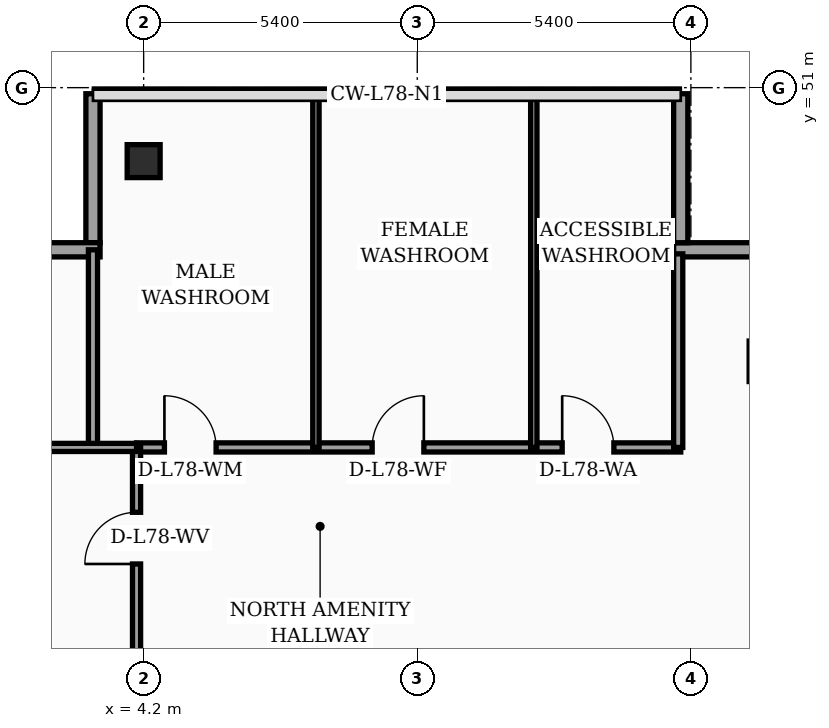
"""IFC4 building model, lengths in metres.
Left out: names, types, materials, properties, quantities, classifications, styles, units other than length and angle.
Written with IfcOpenShell. Run it as: python <this file> out.ifc"""

import sys

from ifc_helpers import new_model, si_unit, direction, frame, frame_2d, origin, origin_2d, place, context, subcontext, project, spatial, rectangle, hollow_rectangle, extrude, element, fill, save


model = new_model("IFC4")
c1 = context("Model", 3, precision=1e-05, world=origin(), true_north=direction((0.0, 1.0)))
c2 = subcontext(c1, "Body", "Model", "MODEL_VIEW")
j1 = project(units=[si_unit("LENGTHUNIT", "METRE"), si_unit("PLANEANGLEUNIT", "RADIAN")], contexts=[c1])
p1 = place(None, origin())
s1 = spatial("IfcSite", under=j1, at=p1, CompositionType="ELEMENT")
p2 = place(p1, origin())
s2 = spatial("IfcBuilding", under=s1, at=p2, CompositionType="ELEMENT")
p3 = place(p2, frame((0.0, 0.0, 316.0)))
s3 = spatial("IfcBuildingStorey", under=s2, at=p3, CompositionType="ELEMENT", Elevation=316.0)
p4 = place(p3, frame((4.2, 49.55, 0.0), z_axis=(0.0, 0.0, 1.0), x_axis=(1.0, 0.0, 0.0)))
e1 = element("IfcColumn", 1, at=p4, inside=s3, PredefinedType="COLUMN", context=c2, shape_type="SweptSolid", body=[
    extrude(hollow_rectangle(XDim=0.65, YDim=0.65, WallThickness=0.028, at=origin_2d()), origin(), (0.0, 0.0, 1.0), 4.26),
])
p5 = place(p3, frame((17.9, 47.8, 0.0), z_axis=(0.0, 0.0, 1.0), x_axis=(-1.0, 0.0, 0.0)))
e2 = element("IfcWall", 2, at=p5, inside=s3, PredefinedType="SOLIDWALL", context=c2, shape_type="SweptSolid", body=[
    extrude(rectangle(XDim=3.24, YDim=0.28, at=frame_2d((1.62, 0.0))), origin(), (0.0, 0.0, 1.0), 4.26),
])
p6 = place(p3, frame((14.8, 47.94, 0.0), z_axis=(0.0, 0.0, 1.0), x_axis=(0.0, 1.0, 0.0)))
e3 = element("IfcWall", 3, at=p6, inside=s3, PredefinedType="SOLIDWALL", context=c2, shape_type="SweptSolid", body=[
    extrude(rectangle(XDim=2.94, YDim=0.28, at=frame_2d((1.47, 0.0))), origin(), (0.0, 0.0, 1.0), 4.26),
])
p7 = place(p3, frame((3.2, 50.88, 0.0), z_axis=(0.0, 0.0, 1.0), x_axis=(0.0, -1.0, 0.0)))
e4 = element("IfcWall", 4, at=p7, inside=s3, PredefinedType="SOLIDWALL", context=c2, shape_type="SweptSolid", body=[
    extrude(rectangle(XDim=2.94, YDim=0.28, at=frame_2d((1.47, 0.0))), origin(), (0.0, 0.0, 1.0), 3.79),
])
p8 = place(p3, frame((3.34, 47.8, 0.0), z_axis=(0.0, 0.0, 1.0), x_axis=(-1.0, 0.0, 0.0)))
e5 = element("IfcWall", 5, at=p8, inside=s3, PredefinedType="SOLIDWALL", context=c2, shape_type="SweptSolid", body=[
    extrude(rectangle(XDim=3.22, YDim=0.28, at=frame_2d((1.61, 0.0))), origin(), (0.0, 0.0, 1.0), 3.79),
])
p9 = place(p3, frame((3.2, 43.9, 0.0), z_axis=(0.0, 0.0, 1.0), x_axis=(0.0, 1.0, 0.0)))
e6 = element("IfcWall", 6, at=p9, inside=s3, PredefinedType="PARTITIONING", context=c2, shape_type="SweptSolid", body=[
    extrude(rectangle(XDim=3.9, YDim=0.18, at=frame_2d((1.95, 0.0))), origin(), (0.0, 0.0, 1.0), 4.26),
])
p10 = place(p3, frame((4.06, 43.9, 0.0), z_axis=(0.0, 0.0, 1.0), x_axis=(1.0, 0.0, 0.0)))
e7 = element("IfcWall", 7, at=p10, inside=s3, PredefinedType="PARTITIONING", context=c2, shape_type="SweptSolid", body=[
    extrude(rectangle(XDim=10.74, YDim=0.18, at=frame_2d((5.37, 0.0))), origin(), (0.0, 0.0, 1.0), 3.69),
])
p11 = place(p10, frame((0.55, 0.0, 0.0)))
e8 = element("IfcOpeningElement", 8, at=p11, cuts=e7, PredefinedType="OPENING", context=c2, shape_type="SweptSolid", body=[
    extrude(rectangle(XDim=1.02, YDim=2.2, at=frame_2d((0.51, 1.1))), frame((0.0, 0.1, 0.0), z_axis=(0.0, -1.0, 0.0), x_axis=(1.0, 0.0, 0.0)), (0.0, 0.0, 1.0), 0.2),
])
p12 = place(p10, frame((4.65, 0.0, 0.0)))
e9 = element("IfcOpeningElement", 9, at=p12, cuts=e7, PredefinedType="OPENING", context=c2, shape_type="SweptSolid", body=[
    extrude(rectangle(XDim=1.02, YDim=2.2, at=frame_2d((0.51, 1.1))), frame((0.0, 0.1, 0.0), z_axis=(0.0, -1.0, 0.0), x_axis=(1.0, 0.0, 0.0)), (0.0, 0.0, 1.0), 0.2),
])
p13 = place(p10, frame((8.4, 0.0, 0.0)))
e10 = element("IfcOpeningElement", 10, at=p13, cuts=e7, PredefinedType="OPENING", context=c2, shape_type="SweptSolid", body=[
    extrude(rectangle(XDim=1.02, YDim=2.2, at=frame_2d((0.51, 1.1))), frame((0.0, 0.1, 0.0), z_axis=(0.0, -1.0, 0.0), x_axis=(1.0, 0.0, 0.0)), (0.0, 0.0, 1.0), 0.2),
])
p14 = place(p3, frame((4.06, 38.4, 0.0), z_axis=(0.0, 0.0, 1.0), x_axis=(0.0, 1.0, 0.0)))
e11 = element("IfcWall", 11, at=p14, inside=s3, PredefinedType="PARTITIONING", context=c2, shape_type="SweptSolid", body=[
    extrude(rectangle(XDim=5.5, YDim=0.16, at=frame_2d((2.75, 0.0))), origin(), (0.0, 0.0, 1.0), 3.69),
])
p15 = place(p14, frame((3.2, 0.0, 0.0)))
e12 = element("IfcOpeningElement", 12, at=p15, cuts=e11, PredefinedType="OPENING", context=c2, shape_type="SweptSolid", body=[
    extrude(rectangle(XDim=1.02, YDim=2.2, at=frame_2d((0.51, 1.1))), frame((0.0, 0.09, 0.0), z_axis=(0.0, -1.0, 0.0), x_axis=(1.0, 0.0, 0.0)), (0.0, 0.0, 1.0), 0.18),
])
p16 = place(p3, frame((0.08, 43.9, 0.0), z_axis=(0.0, 0.0, 1.0), x_axis=(1.0, 0.0, 0.0)))
e13 = element("IfcWall", 13, at=p16, inside=s3, PredefinedType="PARTITIONING", context=c2, shape_type="SweptSolid", body=[
    extrude(rectangle(XDim=3.98, YDim=0.16, at=frame_2d((1.99, 0.0))), origin(), (0.0, 0.0, 1.0), 3.69),
])
p17 = place(p3, frame((14.75, 43.9, 0.0), z_axis=(0.0, 0.0, 1.0), x_axis=(0.0, 1.0, 0.0)))
e14 = element("IfcWall", 14, at=p17, inside=s3, PredefinedType="PARTITIONING", context=c2, shape_type="SweptSolid", body=[
    extrude(rectangle(XDim=3.82, YDim=0.18, at=frame_2d((1.91, 0.0))), origin(), (0.0, 0.0, 1.0), 3.79),
])
for number, where, z_axis, x_axis in (
    (15, (7.6, 43.9, 0.0), (0.0, 0.0, 1.0), (0.0, 1.0, 0.0)),
    (16, (11.9, 43.9, 0.0), (0.0, 0.0, 1.0), (0.0, 1.0, 0.0)),
):
    element("IfcWall", number, at=place(p3, frame(where, z_axis=z_axis, x_axis=x_axis)), inside=s3, PredefinedType="PARTITIONING", context=c2, shape_type="SweptSolid", body=[
        extrude(rectangle(XDim=7.04, YDim=0.125, at=frame_2d((3.52, 0.0))), origin(), (0.0, 0.0, 1.0), 3.79),
    ])
p18 = place(p11, origin())
e17 = element("IfcDoor", 17, at=p18, inside=s3, OperationType="SINGLE_SWING_LEFT", PredefinedType="DOOR", context=c2, shape_type="SweptSolid", body=[
    extrude(rectangle(XDim=1.02, YDim=2.2, at=frame_2d((0.51, 1.1))), frame((0.0, 0.025, 0.0), z_axis=(0.0, -1.0, 0.0), x_axis=(1.0, 0.0, 0.0)), (0.0, 0.0, 1.0), 0.05),
])
fill(e8, e17)
p19 = place(p12, origin())
e18 = element("IfcDoor", 18, at=p19, inside=s3, OperationType="SINGLE_SWING_RIGHT", PredefinedType="DOOR", context=c2, shape_type="SweptSolid", body=[
    extrude(rectangle(XDim=1.02, YDim=2.2, at=frame_2d((0.51, 1.1))), frame((0.0, 0.025, 0.0), z_axis=(0.0, -1.0, 0.0), x_axis=(1.0, 0.0, 0.0)), (0.0, 0.0, 1.0), 0.05),
])
fill(e9, e18)
p20 = place(p13, origin())
e19 = element("IfcDoor", 19, at=p20, inside=s3, OperationType="SINGLE_SWING_LEFT", PredefinedType="DOOR", context=c2, shape_type="SweptSolid", body=[
    extrude(rectangle(XDim=1.02, YDim=2.2, at=frame_2d((0.51, 1.1))), frame((0.0, 0.025, 0.0), z_axis=(0.0, -1.0, 0.0), x_axis=(1.0, 0.0, 0.0)), (0.0, 0.0, 1.0), 0.05),
])
fill(e10, e19)
p21 = place(p15, origin())
e20 = element("IfcDoor", 20, at=p21, inside=s3, OperationType="SINGLE_SWING_LEFT", PredefinedType="DOOR", context=c2, shape_type="SweptSolid", body=[
    extrude(rectangle(XDim=1.02, YDim=2.2, at=frame_2d((0.51, 1.1))), frame((0.0, 0.025, 0.0), z_axis=(0.0, -1.0, 0.0), x_axis=(1.0, 0.0, 0.0)), (0.0, 0.0, 1.0), 0.05),
])
fill(e12, e20)
save(model, sys.argv[1])
